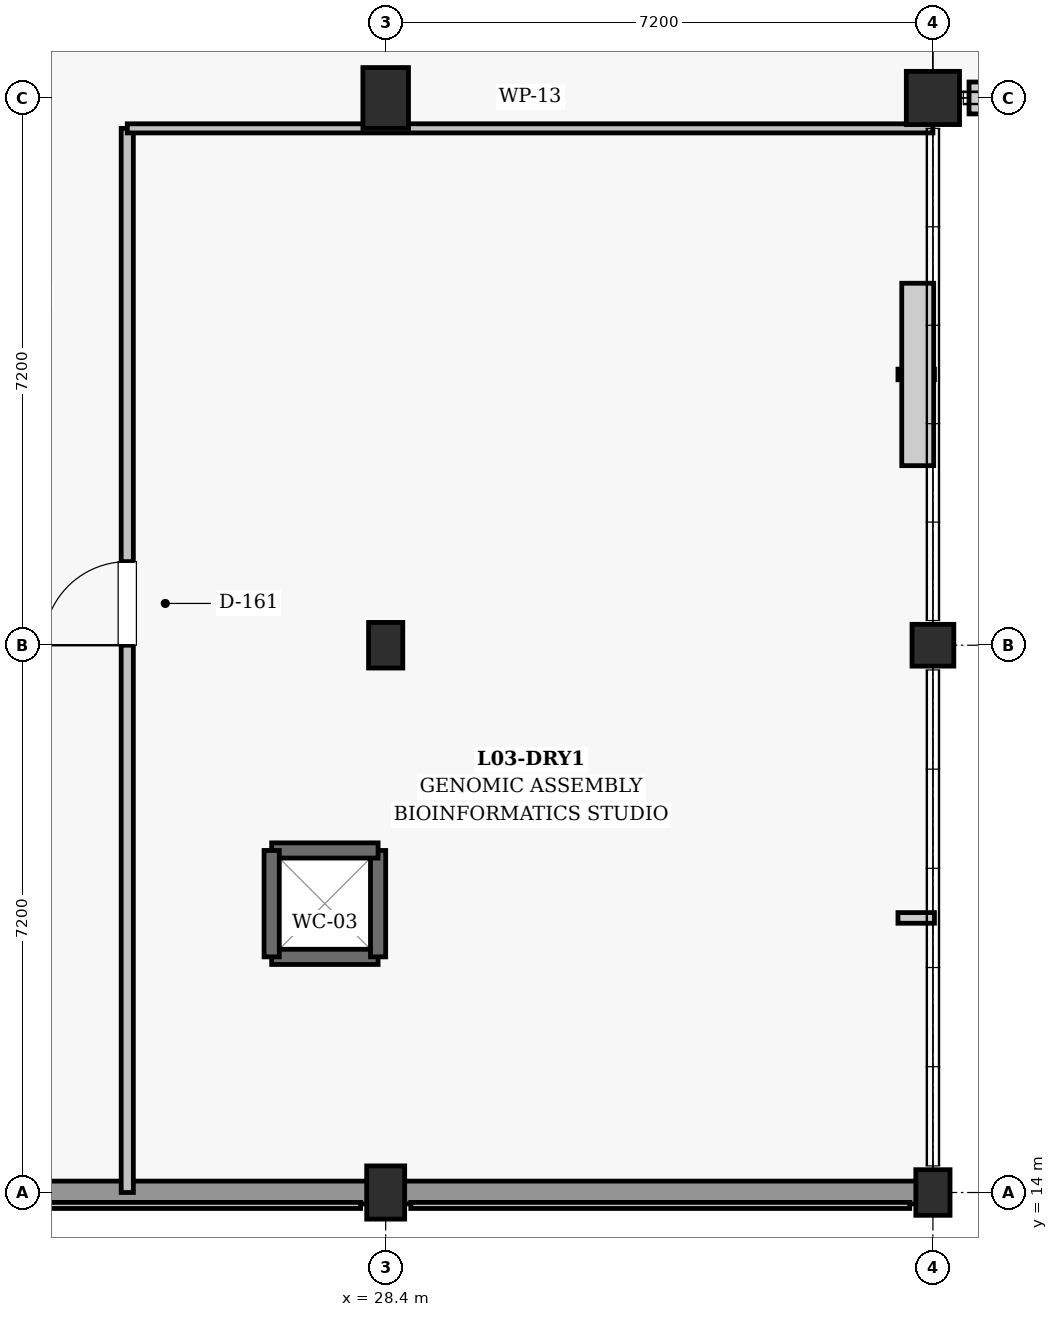
"""IFC4 building model, lengths in metres.
Left out: names, types, materials, properties, quantities, classifications, styles, units other than length and angle.
Written with IfcOpenShell. Run it as: python <this file> out.ifc"""

import sys

from ifc_helpers import new_model, si_unit, direction, frame, frame_2d, origin, origin_2d, place, context, subcontext, project, spatial, rectangle, extrude, element, fill, save


model = new_model("IFC4")
c1 = context("Model", 3, precision=1e-05, world=origin(), true_north=direction((0.0, 1.0)))
c2 = subcontext(c1, "Body", "Model", "MODEL_VIEW")
j1 = project(units=[si_unit("LENGTHUNIT", "METRE"), si_unit("PLANEANGLEUNIT", "RADIAN")], contexts=[c1])
p1 = place(None, origin())
s1 = spatial("IfcSite", under=j1, at=p1, CompositionType="ELEMENT")
p2 = place(p1, origin())
s2 = spatial("IfcBuilding", under=s1, at=p2, CompositionType="ELEMENT")
p3 = place(p2, frame((0.0, 0.0, 14.4)))
s3 = spatial("IfcBuildingStorey", under=s2, at=p3, CompositionType="ELEMENT", Elevation=14.4)
p4 = place(p3, frame((28.4, 14.0, 0.0), z_axis=(0.0, 0.0, 1.0), x_axis=(1.0, 0.0, 0.0)))
e1 = element("IfcColumn", 1, at=p4, inside=s3, PredefinedType="COLUMN", context=c2, shape_type="SweptSolid", body=[
    extrude(rectangle(XDim=0.5, YDim=0.7, at=origin_2d()), origin(), (0.0, 0.0, 1.0), 4.5),
])
p5 = place(p3, frame((28.4, 21.2, 0.0), z_axis=(0.0, 0.0, 1.0), x_axis=(1.0, 0.0, 0.0)))
e2 = element("IfcColumn", 2, at=p5, inside=s3, PredefinedType="COLUMN", context=c2, shape_type="SweptSolid", body=[
    extrude(rectangle(XDim=0.45, YDim=0.6, at=origin_2d()), origin(), (0.0, 0.0, 1.0), 4.5),
])
p6 = place(p3, frame((28.4, 28.4, 0.0), z_axis=(0.0, 0.0, 1.0), x_axis=(1.0, 0.0, 0.0)))
e3 = element("IfcColumn", 3, at=p6, inside=s3, PredefinedType="COLUMN", context=c2, shape_type="SweptSolid", body=[
    extrude(rectangle(XDim=0.6, YDim=0.8, at=origin_2d()), origin(), (0.0, 0.0, 1.0), 4.5),
])
p7 = place(p3, frame((35.6, 14.0, 0.0), z_axis=(0.0, 0.0, 1.0), x_axis=(1.0, 0.0, 0.0)))
e4 = element("IfcColumn", 4, at=p7, inside=s3, PredefinedType="COLUMN", context=c2, shape_type="SweptSolid", body=[
    extrude(rectangle(XDim=0.45, YDim=0.6, at=origin_2d()), origin(), (0.0, 0.0, 1.0), 4.5),
])
p8 = place(p3, frame((35.6, 21.2, 0.0), z_axis=(0.0, 0.0, 1.0), x_axis=(1.0, 0.0, 0.0)))
e5 = element("IfcColumn", 5, at=p8, inside=s3, PredefinedType="COLUMN", context=c2, shape_type="SweptSolid", body=[
    extrude(rectangle(XDim=0.55, YDim=0.55, at=origin_2d()), origin(), (0.0, 0.0, 1.0), 4.5),
])
p9 = place(p3, frame((35.6, 28.4, 0.0), z_axis=(0.0, 0.0, 1.0), x_axis=(1.0, 0.0, 0.0)))
e6 = element("IfcColumn", 6, at=p9, inside=s3, PredefinedType="COLUMN", context=c2, shape_type="SweptSolid", body=[
    extrude(rectangle(XDim=0.7, YDim=0.7, at=origin_2d()), origin(), (0.0, 0.0, 1.0), 4.5),
])
p10 = place(p3, frame((21.48, 14.0, 0.0), z_axis=(0.0, 0.0, 1.0), x_axis=(1.0, 0.0, 0.0)))
e7 = element("IfcWall", 7, at=p10, inside=s3, PredefinedType="SOLIDWALL", context=c2, shape_type="SweptSolid", body=[
    extrude(rectangle(XDim=6.69, YDim=0.3, at=frame_2d((3.345, 0.0))), origin(), (0.0, 0.0, 1.0), 3.475),
])
p11 = place(p3, frame((28.63, 14.0, 0.0), z_axis=(0.0, 0.0, 1.0), x_axis=(1.0, 0.0, 0.0)))
e8 = element("IfcWall", 8, at=p11, inside=s3, PredefinedType="SOLIDWALL", context=c2, shape_type="SweptSolid", body=[
    extrude(rectangle(XDim=6.765, YDim=0.3, at=frame_2d((3.383, 0.0))), origin(), (0.0, 0.0, 1.0), 3.575),
])
p12 = place(p3, frame((26.9, 17.1, 0.0), z_axis=(0.0, 0.0, 1.0), x_axis=(1.0, 0.0, 0.0)))
e9 = element("IfcWall", 9, at=p12, inside=s3, PredefinedType="SHEAR", context=c2, shape_type="SweptSolid", body=[
    extrude(rectangle(XDim=1.4, YDim=0.2, at=frame_2d((0.7, 0.0))), origin(), (0.0, 0.0, 1.0), 4.16),
])
p13 = place(p3, frame((28.3, 17.1, 0.0), z_axis=(0.0, 0.0, 1.0), x_axis=(0.0, 1.0, 0.0)))
e10 = element("IfcWall", 10, at=p13, inside=s3, PredefinedType="SHEAR", context=c2, shape_type="SweptSolid", body=[
    extrude(rectangle(XDim=1.4, YDim=0.2, at=frame_2d((0.7, 0.0))), origin(), (0.0, 0.0, 1.0), 4.16),
])
p14 = place(p3, frame((28.3, 18.5, 0.0), z_axis=(0.0, 0.0, 1.0), x_axis=(-1.0, 0.0, 0.0)))
e11 = element("IfcWall", 11, at=p14, inside=s3, PredefinedType="SHEAR", context=c2, shape_type="SweptSolid", body=[
    extrude(rectangle(XDim=1.4, YDim=0.2, at=frame_2d((0.7, 0.0))), origin(), (0.0, 0.0, 1.0), 4.16),
])
p15 = place(p3, frame((26.9, 18.5, 0.0), z_axis=(0.0, 0.0, 1.0), x_axis=(0.0, -1.0, 0.0)))
e12 = element("IfcWall", 12, at=p15, inside=s3, PredefinedType="SHEAR", context=c2, shape_type="SweptSolid", body=[
    extrude(rectangle(XDim=1.4, YDim=0.2, at=frame_2d((0.7, 0.0))), origin(), (0.0, 0.0, 1.0), 4.16),
])
p16 = place(p3, frame((25.0, 14.0, 0.0), z_axis=(0.0, 0.0, 1.0), x_axis=(0.0, 1.0, 0.0)))
e13 = element("IfcWall", 13, at=p16, inside=s3, PredefinedType="PARTITIONING", context=c2, shape_type="SweptSolid", body=[
    extrude(rectangle(XDim=14.0, YDim=0.16, at=frame_2d((7.0, 0.0))), origin(), (0.0, 0.0, 1.0), 3.48),
])
p17 = place(p16, frame((7.2, 0.0, 0.0)))
e14 = element("IfcOpeningElement", 14, at=p17, cuts=e13, PredefinedType="OPENING", context=c2, shape_type="SweptSolid", body=[
    extrude(rectangle(XDim=1.1, YDim=2.15, at=frame_2d((0.55, 1.075))), frame((0.0, 0.09, 0.0), z_axis=(0.0, -1.0, 0.0), x_axis=(1.0, 0.0, 0.0)), (0.0, 0.0, 1.0), 0.18),
])
p18 = place(p3, frame((25.0, 28.0, 0.0), z_axis=(0.0, 0.0, 1.0), x_axis=(1.0, 0.0, 0.0)))
e15 = element("IfcWall", 15, at=p18, inside=s3, PredefinedType="PARTITIONING", context=c2, shape_type="SweptSolid", body=[
    extrude(rectangle(XDim=10.6, YDim=0.12, at=frame_2d((5.3, 0.0))), origin(), (0.0, 0.0, 1.0), 3.58),
])
p19 = place(p17, origin())
e16 = element("IfcDoor", 16, at=p19, inside=s3, OperationType="SINGLE_SWING_LEFT", PredefinedType="DOOR", context=c2, shape_type="SweptSolid", body=[
    extrude(rectangle(XDim=1.1, YDim=2.15, at=frame_2d((0.55, 1.075))), frame((0.0, 0.025, 0.0), z_axis=(0.0, -1.0, 0.0), x_axis=(1.0, 0.0, 0.0)), (0.0, 0.0, 1.0), 0.05),
])
fill(e14, e16)
save(model, sys.argv[1])
